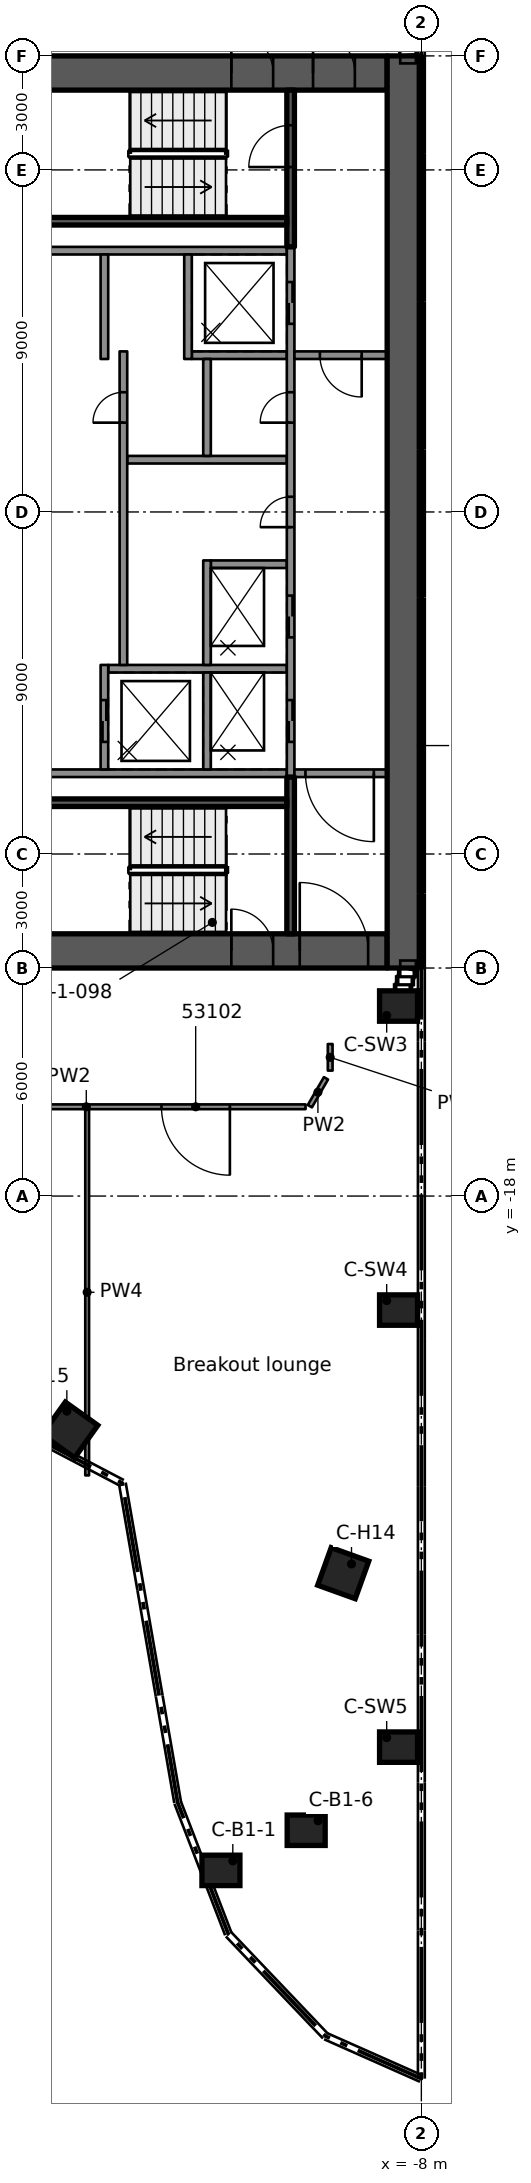
"""IFC4 building model, lengths in metres.
Left out: names, types, materials, properties, quantities, classifications, styles, units other than length and angle.
Written with IfcOpenShell. Run it as: python <this file> out.ifc"""

import sys

from ifc_helpers import new_model, si_unit, direction, frame, frame_2d, origin, origin_2d, place, context, subcontext, project, spatial, rectangle, extrude, element, fill, save


model = new_model("IFC4")
c1 = context("Model", 3, precision=1e-05, world=origin(), true_north=direction((0.0, 1.0)))
c2 = subcontext(c1, "Body", "Model", "MODEL_VIEW")
j1 = project(units=[si_unit("LENGTHUNIT", "METRE"), si_unit("PLANEANGLEUNIT", "RADIAN")], contexts=[c1])
p1 = place(None, origin())
s1 = spatial("IfcSite", under=j1, at=p1, CompositionType="ELEMENT")
p2 = place(p1, origin())
s2 = spatial("IfcBuilding", under=s1, at=p2, CompositionType="ELEMENT")
p3 = place(p2, frame((0.0, 0.0, 267.5)))
s3 = spatial("IfcBuildingStorey", under=s2, at=p3, CompositionType="ELEMENT", Elevation=267.5)
p4 = place(p3, frame((-18.1, 11.55, 0.0), z_axis=(0.0, 0.0, 1.0), x_axis=(1.0, 0.0, 0.0)))
e1 = element("IfcWall", 1, at=p4, inside=s3, PredefinedType="SHEAR", context=c2, shape_type="SweptSolid", body=[
    extrude(rectangle(XDim=9.2, YDim=0.9, at=frame_2d((4.6, 0.0))), origin(), (0.0, 0.0, 1.0), 3.5),
])
p5 = place(p4, frame((7.25, 0.0, 0.0)))
e2 = element("IfcOpeningElement", 2, at=p5, cuts=e1, PredefinedType="OPENING", context=c2, shape_type="SweptSolid", body=[
    extrude(rectangle(XDim=1.1, YDim=2.1, at=frame_2d((0.55, 1.05))), frame((0.0, 0.46, 0.0), z_axis=(0.0, -1.0, 0.0), x_axis=(1.0, 0.0, 0.0)), (0.0, 0.0, 1.0), 0.92),
])
p6 = place(p4, frame((5.1, 0.0, 0.0)))
e3 = element("IfcOpeningElement", 3, at=p6, cuts=e1, PredefinedType="OPENING", context=c2, shape_type="SweptSolid", body=[
    extrude(rectangle(XDim=1.1, YDim=2.1, at=frame_2d((0.55, 1.05))), frame((0.0, 0.46, 0.0), z_axis=(0.0, -1.0, 0.0), x_axis=(1.0, 0.0, 0.0)), (0.0, 0.0, 1.0), 0.92),
])
p7 = place(p3, frame((-18.1, -11.55, 0.0), z_axis=(0.0, 0.0, 1.0), x_axis=(1.0, 0.0, 0.0)))
e4 = element("IfcWall", 4, at=p7, inside=s3, PredefinedType="SHEAR", context=c2, shape_type="SweptSolid", body=[
    extrude(rectangle(XDim=9.2, YDim=0.9, at=frame_2d((4.6, 0.0))), origin(), (0.0, 0.0, 1.0), 3.5),
])
p8 = place(p7, frame((6.9, 0.0, 0.0)))
e5 = element("IfcOpeningElement", 5, at=p8, cuts=e4, PredefinedType="OPENING", context=c2, shape_type="SweptSolid", body=[
    extrude(rectangle(XDim=1.8, YDim=2.1, at=frame_2d((0.9, 1.05))), frame((0.0, 0.46, 0.0), z_axis=(0.0, -1.0, 0.0), x_axis=(1.0, 0.0, 0.0)), (0.0, 0.0, 1.0), 0.92),
])
p9 = place(p7, frame((5.1, 0.0, 0.0)))
e6 = element("IfcOpeningElement", 6, at=p9, cuts=e4, PredefinedType="OPENING", context=c2, shape_type="SweptSolid", body=[
    extrude(rectangle(XDim=1.1, YDim=2.1, at=frame_2d((0.55, 1.05))), frame((0.0, 0.46, 0.0), z_axis=(0.0, -1.0, 0.0), x_axis=(1.0, 0.0, 0.0)), (0.0, 0.0, 1.0), 0.92),
])
p10 = place(p3, frame((-8.45, -12.0, 0.0), z_axis=(0.0, 0.0, 1.0), x_axis=(0.0, 1.0, 0.0)))
e7 = element("IfcWall", 7, at=p10, inside=s3, PredefinedType="SHEAR", context=c2, shape_type="SweptSolid", body=[
    extrude(rectangle(XDim=24.0, YDim=0.9, at=frame_2d((12.0, 0.0))), origin(), (0.0, 0.0, 1.0), 3.5),
])
for number, where, z_axis, x_axis in (
    (8, (-13.274, -35.743, 0.0), (0.0, 0.0, 1.0), (1.0, 0.0, 0.0)),
    (9, (-11.031, -34.687, 0.0), (0.0, 0.0, 1.0), (1.0, 0.0, 0.0)),
):
    element("IfcColumn", number, at=place(p3, frame(where, z_axis=z_axis, x_axis=x_axis)), inside=s3, PredefinedType="COLUMN", context=c2, shape_type="SweptSolid", body=[
        extrude(rectangle(XDim=1.0, YDim=0.8, at=origin_2d()), origin(), (0.0, 0.0, 1.0), 3.5),
    ])
for number, where, z_axis, x_axis in (
    (10, (-10.056, -27.923, 0.0), (0.0, 0.0, 1.0), (-0.339, -0.941, 0.0)),
    (11, (-17.246, -24.154, 0.0), (0.0, 0.0, 1.0), (-0.581, -0.814, 0.0)),
):
    element("IfcColumn", number, at=place(p3, frame(where, z_axis=z_axis, x_axis=x_axis)), inside=s3, PredefinedType="COLUMN", context=c2, shape_type="SweptSolid", body=[
        extrude(rectangle(XDim=1.05, YDim=1.05, at=origin_2d()), origin(), (0.0, 0.0, 1.0), 3.5),
    ])
for number, where, z_axis, x_axis in (
    (12, (-8.6, -13.0, 0.0), (0.0, 0.0, 1.0), (1.0, 0.0, 0.0)),
    (13, (-8.6, -21.0, 0.0), (0.0, 0.0, 1.0), (1.0, 0.0, 0.0)),
    (14, (-8.6, -32.5, 0.0), (0.0, 0.0, 1.0), (1.0, 0.0, 0.0)),
):
    element("IfcColumn", number, at=place(p3, frame(where, z_axis=z_axis, x_axis=x_axis)), inside=s3, PredefinedType="COLUMN", context=c2, shape_type="SweptSolid", body=[
        extrude(rectangle(XDim=1.0, YDim=0.8, at=origin_2d()), origin(), (0.0, 0.0, 1.0), 3.5),
    ])
for number, where, z_axis, x_axis in (
    (15, (-11.54, 6.875, 0.0), (0.0, 0.0, 1.0), (-1.0, 0.0, 0.0)),
    (16, (-11.54, -6.875, 0.0), (0.0, 0.0, 1.0), (-1.0, 0.0, 0.0)),
):
    element("IfcWall", number, at=place(p3, frame(where, z_axis=z_axis, x_axis=x_axis)), inside=s3, PredefinedType="SOLIDWALL", context=c2, shape_type="SweptSolid", body=[
        extrude(rectangle(XDim=6.56, YDim=0.2, at=frame_2d((3.28, 0.0))), origin(), (0.0, 0.0, 1.0), 3.05),
    ])
p11 = place(p3, frame((-11.54, -4.125, 0.0), z_axis=(0.0, 0.0, 1.0), x_axis=(-1.0, 0.0, 0.0)))
e17 = element("IfcWall", 17, at=p11, inside=s3, PredefinedType="SOLIDWALL", context=c2, shape_type="SweptSolid", body=[
    extrude(rectangle(XDim=4.7, YDim=0.2, at=frame_2d((2.35, 0.0))), origin(), (0.0, 0.0, 1.0), 3.05),
])
p12 = place(p3, frame((-11.54, -1.375, 0.0), z_axis=(0.0, 0.0, 1.0), x_axis=(-1.0, 0.0, 0.0)))
e18 = element("IfcWall", 18, at=p12, inside=s3, PredefinedType="SOLIDWALL", context=c2, shape_type="SweptSolid", body=[
    extrude(rectangle(XDim=2.0, YDim=0.2, at=frame_2d((1.0, 0.0))), origin(), (0.0, 0.0, 1.0), 3.05),
])
p13 = place(p3, frame((-11.54, 1.375, 0.0), z_axis=(0.0, 0.0, 1.0), x_axis=(-1.0, 0.0, 0.0)))
e19 = element("IfcWall", 19, at=p13, inside=s3, PredefinedType="SOLIDWALL", context=c2, shape_type="SweptSolid", body=[
    extrude(rectangle(XDim=4.2, YDim=0.2, at=frame_2d((2.1, 0.0))), origin(), (0.0, 0.0, 1.0), 3.05),
])
p14 = place(p3, frame((-11.54, 4.125, 0.0), z_axis=(0.0, 0.0, 1.0), x_axis=(-1.0, 0.0, 0.0)))
e20 = element("IfcWall", 20, at=p14, inside=s3, PredefinedType="SOLIDWALL", context=c2, shape_type="SweptSolid", body=[
    extrude(rectangle(XDim=2.5, YDim=0.2, at=frame_2d((1.25, 0.0))), origin(), (0.0, 0.0, 1.0), 3.05),
])
p15 = place(p3, frame((-11.44, -6.975, 0.0), z_axis=(0.0, 0.0, 1.0), x_axis=(0.0, 1.0, 0.0)))
e21 = element("IfcWall", 21, at=p15, inside=s3, PredefinedType="SOLIDWALL", context=c2, shape_type="SweptSolid", body=[
    extrude(rectangle(XDim=13.95, YDim=0.2, at=frame_2d((6.975, 0.0))), origin(), (0.0, 0.0, 1.0), 3.05),
])
p16 = place(p15, frame((0.925, 0.0, 0.0)))
e22 = element("IfcOpeningElement", 22, at=p16, cuts=e21, PredefinedType="OPENING", context=c2, shape_type="SweptSolid", body=[
    extrude(rectangle(XDim=1.1, YDim=2.1, at=frame_2d((0.55, 1.05))), frame((0.0, 0.11, 0.0), z_axis=(0.0, -1.0, 0.0), x_axis=(1.0, 0.0, 0.0)), (0.0, 0.0, 1.0), 0.22),
])
p17 = place(p15, frame((3.675, 0.0, 0.0)))
e23 = element("IfcOpeningElement", 23, at=p17, cuts=e21, PredefinedType="OPENING", context=c2, shape_type="SweptSolid", body=[
    extrude(rectangle(XDim=1.1, YDim=2.1, at=frame_2d((0.55, 1.05))), frame((0.0, 0.11, 0.0), z_axis=(0.0, -1.0, 0.0), x_axis=(1.0, 0.0, 0.0)), (0.0, 0.0, 1.0), 0.22),
])
p18 = place(p15, frame((11.925, 0.0, 0.0)))
e24 = element("IfcOpeningElement", 24, at=p18, cuts=e21, PredefinedType="OPENING", context=c2, shape_type="SweptSolid", body=[
    extrude(rectangle(XDim=1.1, YDim=2.1, at=frame_2d((0.55, 1.05))), frame((0.0, 0.11, 0.0), z_axis=(0.0, -1.0, 0.0), x_axis=(1.0, 0.0, 0.0)), (0.0, 0.0, 1.0), 0.22),
])
p19 = place(p15, frame((6.575, 0.0, 0.0)))
e25 = element("IfcOpeningElement", 25, at=p19, cuts=e21, PredefinedType="OPENING", context=c2, shape_type="SweptSolid", body=[
    extrude(rectangle(XDim=0.8, YDim=2.1, at=frame_2d((0.4, 1.05))), frame((0.0, 0.11, 0.0), z_axis=(0.0, -1.0, 0.0), x_axis=(1.0, 0.0, 0.0)), (0.0, 0.0, 1.0), 0.22),
])
p20 = place(p15, frame((9.325, 0.0, 0.0)))
e26 = element("IfcOpeningElement", 26, at=p20, cuts=e21, PredefinedType="OPENING", context=c2, shape_type="SweptSolid", body=[
    extrude(rectangle(XDim=0.8, YDim=2.1, at=frame_2d((0.4, 1.05))), frame((0.0, 0.11, 0.0), z_axis=(0.0, -1.0, 0.0), x_axis=(1.0, 0.0, 0.0)), (0.0, 0.0, 1.0), 0.22),
])
p21 = place(p3, frame((-13.64, -6.775, 0.0), z_axis=(0.0, 0.0, 1.0), x_axis=(0.0, 1.0, 0.0)))
e27 = element("IfcWall", 27, at=p21, inside=s3, PredefinedType="SOLIDWALL", context=c2, shape_type="SweptSolid", body=[
    extrude(rectangle(XDim=2.55, YDim=0.2, at=frame_2d((1.275, 0.0))), origin(), (0.0, 0.0, 1.0), 3.05),
])
p22 = place(p3, frame((-13.64, -4.025, 0.0), z_axis=(0.0, 0.0, 1.0), x_axis=(0.0, 1.0, 0.0)))
e28 = element("IfcWall", 28, at=p22, inside=s3, PredefinedType="SOLIDWALL", context=c2, shape_type="SweptSolid", body=[
    extrude(rectangle(XDim=2.75, YDim=0.2, at=frame_2d((1.375, 0.0))), origin(), (0.0, 0.0, 1.0), 3.05),
])
p23 = place(p3, frame((-13.64, 1.475, 0.0), z_axis=(0.0, 0.0, 1.0), x_axis=(0.0, 1.0, 0.0)))
e29 = element("IfcWall", 29, at=p23, inside=s3, PredefinedType="SOLIDWALL", context=c2, shape_type="SweptSolid", body=[
    extrude(rectangle(XDim=2.55, YDim=0.2, at=frame_2d((1.275, 0.0))), origin(), (0.0, 0.0, 1.0), 3.05),
])
p24 = place(p3, frame((-14.14, 4.025, 0.0), z_axis=(0.0, 0.0, 1.0), x_axis=(0.0, 1.0, 0.0)))
e30 = element("IfcWall", 30, at=p24, inside=s3, PredefinedType="SOLIDWALL", context=c2, shape_type="SweptSolid", body=[
    extrude(rectangle(XDim=2.75, YDim=0.2, at=frame_2d((1.375, 0.0))), origin(), (0.0, 0.0, 1.0), 3.05),
])
p25 = place(p3, frame((-16.34, -6.775, 0.0), z_axis=(0.0, 0.0, 1.0), x_axis=(0.0, 1.0, 0.0)))
e31 = element("IfcWall", 31, at=p25, inside=s3, PredefinedType="SOLIDWALL", context=c2, shape_type="SweptSolid", body=[
    extrude(rectangle(XDim=2.75, YDim=0.2, at=frame_2d((1.375, 0.0))), origin(), (0.0, 0.0, 1.0), 3.05),
])
p26 = place(p25, frame((0.725, 0.0, 0.0)))
e32 = element("IfcOpeningElement", 32, at=p26, cuts=e31, PredefinedType="OPENING", context=c2, shape_type="SweptSolid", body=[
    extrude(rectangle(XDim=1.1, YDim=2.1, at=frame_2d((0.55, 1.05))), frame((0.0, 0.11, 0.0), z_axis=(0.0, -1.0, 0.0), x_axis=(1.0, 0.0, 0.0)), (0.0, 0.0, 1.0), 0.22),
])
p27 = place(p3, frame((-15.84, -4.025, 0.0), z_axis=(0.0, 0.0, 1.0), x_axis=(0.0, 1.0, 0.0)))
e33 = element("IfcWall", 33, at=p27, inside=s3, PredefinedType="SOLIDWALL", context=c2, shape_type="SweptSolid", body=[
    extrude(rectangle(XDim=8.25, YDim=0.2, at=frame_2d((4.125, 0.0))), origin(), (0.0, 0.0, 1.0), 3.05),
])
p28 = place(p27, frame((6.375, 0.0, 0.0)))
e34 = element("IfcOpeningElement", 34, at=p28, cuts=e33, PredefinedType="OPENING", context=c2, shape_type="SweptSolid", body=[
    extrude(rectangle(XDim=0.8, YDim=2.1, at=frame_2d((0.4, 1.05))), frame((0.0, 0.11, 0.0), z_axis=(0.0, -1.0, 0.0), x_axis=(1.0, 0.0, 0.0)), (0.0, 0.0, 1.0), 0.22),
])
p29 = place(p3, frame((-16.34, 4.025, 0.0), z_axis=(0.0, 0.0, 1.0), x_axis=(0.0, 1.0, 0.0)))
e35 = element("IfcWall", 35, at=p29, inside=s3, PredefinedType="SOLIDWALL", context=c2, shape_type="SweptSolid", body=[
    extrude(rectangle(XDim=2.75, YDim=0.2, at=frame_2d((1.375, 0.0))), origin(), (0.0, 0.0, 1.0), 3.05),
])
p30 = place(p3, frame((-11.44, 6.975, 0.0), z_axis=(0.0, 0.0, 1.0), x_axis=(0.0, 1.0, 0.0)))
e36 = element("IfcWall", 36, at=p30, inside=s3, PredefinedType="SOLIDWALL", context=c2, shape_type="SweptSolid", body=[
    extrude(rectangle(XDim=4.125, YDim=0.2, at=frame_2d((2.062, 0.0))), origin(), (0.0, 0.0, 1.0), 3.05),
])
p31 = place(p30, frame((2.1, 0.0, 0.0)))
e37 = element("IfcOpeningElement", 37, at=p31, cuts=e36, PredefinedType="OPENING", context=c2, shape_type="SweptSolid", body=[
    extrude(rectangle(XDim=1.1, YDim=2.1, at=frame_2d((0.55, 1.05))), frame((0.0, 0.11, 0.0), z_axis=(0.0, -1.0, 0.0), x_axis=(1.0, 0.0, 0.0)), (0.0, 0.0, 1.0), 0.22),
])
p32 = place(p3, frame((-11.54, 7.65, 0.0), z_axis=(0.0, 0.0, 1.0), x_axis=(-1.0, 0.0, 0.0)))
e38 = element("IfcWall", 38, at=p32, inside=s3, PredefinedType="SOLIDWALL", context=c2, shape_type="SweptSolid", body=[
    extrude(rectangle(XDim=6.56, YDim=0.2, at=frame_2d((3.28, 0.0))), origin(), (0.0, 0.0, 1.0), 3.05),
])
p33 = place(p3, frame((-11.44, -11.1, 0.0), z_axis=(0.0, 0.0, 1.0), x_axis=(0.0, 1.0, 0.0)))
e39 = element("IfcWall", 39, at=p33, inside=s3, PredefinedType="SOLIDWALL", context=c2, shape_type="SweptSolid", body=[
    extrude(rectangle(XDim=4.125, YDim=0.2, at=frame_2d((2.062, 0.0))), origin(), (0.0, 0.0, 1.0), 3.05),
])
p34 = place(p3, frame((-11.54, -7.65, 0.0), z_axis=(0.0, 0.0, 1.0), x_axis=(-1.0, 0.0, 0.0)))
e40 = element("IfcWall", 40, at=p34, inside=s3, PredefinedType="SOLIDWALL", context=c2, shape_type="SweptSolid", body=[
    extrude(rectangle(XDim=6.56, YDim=0.2, at=frame_2d((3.28, 0.0))), origin(), (0.0, 0.0, 1.0), 3.05),
])
p35 = place(p3, frame((-8.9, 4.125, 0.0), z_axis=(0.0, 0.0, 1.0), x_axis=(-1.0, 0.0, 0.0)))
e41 = element("IfcWall", 41, at=p35, inside=s3, PredefinedType="PARTITIONING", context=c2, shape_type="SweptSolid", body=[
    extrude(rectangle(XDim=2.44, YDim=0.2, at=frame_2d((1.22, 0.0))), origin(), (0.0, 0.0, 1.0), 3.05),
])
p36 = place(p35, frame((0.67, 0.0, 0.0)))
e42 = element("IfcOpeningElement", 42, at=p36, cuts=e41, PredefinedType="OPENING", context=c2, shape_type="SweptSolid", body=[
    extrude(rectangle(XDim=1.1, YDim=2.1, at=frame_2d((0.55, 1.05))), frame((0.0, 0.11, 0.0), z_axis=(0.0, -1.0, 0.0), x_axis=(1.0, 0.0, 0.0)), (0.0, 0.0, 1.0), 0.22),
])
p37 = place(p3, frame((-8.9, -6.875, 0.0), z_axis=(0.0, 0.0, 1.0), x_axis=(-1.0, 0.0, 0.0)))
e43 = element("IfcWall", 43, at=p37, inside=s3, PredefinedType="PARTITIONING", context=c2, shape_type="SweptSolid", body=[
    extrude(rectangle(XDim=2.44, YDim=0.2, at=frame_2d((1.22, 0.0))), origin(), (0.0, 0.0, 1.0), 3.05),
])
p38 = place(p37, frame((0.35, 0.0, 0.0)))
e44 = element("IfcOpeningElement", 44, at=p38, cuts=e43, PredefinedType="OPENING", context=c2, shape_type="SweptSolid", body=[
    extrude(rectangle(XDim=1.8, YDim=2.1, at=frame_2d((0.9, 1.05))), frame((0.0, 0.11, 0.0), z_axis=(0.0, -1.0, 0.0), x_axis=(1.0, 0.0, 0.0)), (0.0, 0.0, 1.0), 0.22),
])
p39 = place(p3, frame((-11.047, -15.651, 0.0), z_axis=(0.0, 0.0, 1.0), x_axis=(-1.0, 0.0, 0.0)))
e45 = element("IfcWall", 45, at=p39, inside=s3, PredefinedType="PARTITIONING", context=c2, shape_type="SweptSolid", body=[
    extrude(rectangle(XDim=11.54, YDim=0.125, at=frame_2d((5.77, 0.0))), origin(), (0.0, 0.0, 1.0), 3.03),
])
p40 = place(p39, frame((1.992, 0.0, 0.0)))
e46 = element("IfcOpeningElement", 46, at=p40, cuts=e45, PredefinedType="OPENING", context=c2, shape_type="SweptSolid", body=[
    extrude(rectangle(XDim=1.8, YDim=2.1, at=frame_2d((0.9, 1.05))), frame((0.0, 0.073, 0.0), z_axis=(0.0, -1.0, 0.0), x_axis=(1.0, 0.0, 0.0)), (0.0, 0.0, 1.0), 0.145),
])
p41 = place(p3, frame((-10.934, -15.635, 0.0), z_axis=(0.0, 0.0, 1.0), x_axis=(0.500820310379, 0.865551279077, 0.0)))
e47 = element("IfcWall", 47, at=p41, inside=s3, PredefinedType="PARTITIONING", context=c2, shape_type="SweptSolid", body=[
    extrude(rectangle(XDim=0.847, YDim=0.125, at=frame_2d((0.423, 0.0))), origin(), (0.0, 0.0, 1.0), 3.03),
])
p42 = place(p3, frame((-10.399, -14.699, 0.0), z_axis=(0.0, 0.0, 1.0), x_axis=(0.0, 1.0, 0.0)))
e48 = element("IfcWall", 48, at=p42, inside=s3, PredefinedType="PARTITIONING", context=c2, shape_type="SweptSolid", body=[
    extrude(rectangle(XDim=0.699, YDim=0.125, at=frame_2d((0.35, 0.0))), origin(), (0.0, 0.0, 1.0), 3.03),
])
p43 = place(p3, frame((-16.794, -25.35, 0.0), z_axis=(0.0, 0.0, 1.0), x_axis=(0.0, 1.0, 0.0)))
e49 = element("IfcWall", 49, at=p43, inside=s3, PredefinedType="PARTITIONING", context=c2, shape_type="SweptSolid", body=[
    extrude(rectangle(XDim=9.637, YDim=0.1, at=frame_2d((4.819, 0.0))), origin(), (0.0, 0.0, 1.0), 2.419),
])
p44 = place(p16, origin())
e50 = element("IfcDoor", 50, at=p44, inside=s3, OperationType="DOUBLE_DOOR_SLIDING", PredefinedType="DOOR", context=c2, shape_type="SweptSolid", body=[
    extrude(rectangle(XDim=1.1, YDim=2.1, at=frame_2d((0.55, 1.05))), frame((0.0, 0.025, 0.0), z_axis=(0.0, -1.0, 0.0), x_axis=(1.0, 0.0, 0.0)), (0.0, 0.0, 1.0), 0.05),
])
fill(e22, e50)
p45 = place(p26, origin())
e51 = element("IfcDoor", 51, at=p45, inside=s3, OperationType="DOUBLE_DOOR_SLIDING", PredefinedType="DOOR", context=c2, shape_type="SweptSolid", body=[
    extrude(rectangle(XDim=1.1, YDim=2.1, at=frame_2d((0.55, 1.05))), frame((0.0, 0.025, 0.0), z_axis=(0.0, -1.0, 0.0), x_axis=(1.0, 0.0, 0.0)), (0.0, 0.0, 1.0), 0.05),
])
fill(e32, e51)
p46 = place(p17, origin())
e52 = element("IfcDoor", 52, at=p46, inside=s3, OperationType="DOUBLE_DOOR_SLIDING", PredefinedType="DOOR", context=c2, shape_type="SweptSolid", body=[
    extrude(rectangle(XDim=1.1, YDim=2.1, at=frame_2d((0.55, 1.05))), frame((0.0, 0.025, 0.0), z_axis=(0.0, -1.0, 0.0), x_axis=(1.0, 0.0, 0.0)), (0.0, 0.0, 1.0), 0.05),
])
fill(e23, e52)
p47 = place(p18, origin())
e53 = element("IfcDoor", 53, at=p47, inside=s3, OperationType="DOUBLE_DOOR_SLIDING", PredefinedType="DOOR", context=c2, shape_type="SweptSolid", body=[
    extrude(rectangle(XDim=1.1, YDim=2.1, at=frame_2d((0.55, 1.05))), frame((0.0, 0.025, 0.0), z_axis=(0.0, -1.0, 0.0), x_axis=(1.0, 0.0, 0.0)), (0.0, 0.0, 1.0), 0.05),
])
fill(e24, e53)
p48 = place(p19, origin())
e54 = element("IfcDoor", 54, at=p48, inside=s3, OperationType="SINGLE_SWING_RIGHT", PredefinedType="DOOR", context=c2, shape_type="SweptSolid", body=[
    extrude(rectangle(XDim=0.8, YDim=2.1, at=frame_2d((0.4, 1.05))), frame((0.0, 0.025, 0.0), z_axis=(0.0, -1.0, 0.0), x_axis=(1.0, 0.0, 0.0)), (0.0, 0.0, 1.0), 0.05),
])
fill(e25, e54)
p49 = place(p20, origin())
e55 = element("IfcDoor", 55, at=p49, inside=s3, OperationType="SINGLE_SWING_LEFT", PredefinedType="DOOR", context=c2, shape_type="SweptSolid", body=[
    extrude(rectangle(XDim=0.8, YDim=2.1, at=frame_2d((0.4, 1.05))), frame((0.0, 0.025, 0.0), z_axis=(0.0, -1.0, 0.0), x_axis=(1.0, 0.0, 0.0)), (0.0, 0.0, 1.0), 0.05),
])
fill(e26, e55)
p50 = place(p28, origin())
e56 = element("IfcDoor", 56, at=p50, inside=s3, OperationType="SINGLE_SWING_LEFT", PredefinedType="DOOR", context=c2, shape_type="SweptSolid", body=[
    extrude(rectangle(XDim=0.8, YDim=2.1, at=frame_2d((0.4, 1.05))), frame((0.0, 0.025, 0.0), z_axis=(0.0, -1.0, 0.0), x_axis=(1.0, 0.0, 0.0)), (0.0, 0.0, 1.0), 0.05),
])
fill(e34, e56)
p51 = place(p5, origin())
e57 = element("IfcDoor", 57, at=p51, inside=s3, OperationType="SINGLE_SWING_RIGHT", PredefinedType="DOOR", context=c2, shape_type="SweptSolid", body=[
    extrude(rectangle(XDim=1.1, YDim=2.1, at=frame_2d((0.55, 1.05))), frame((0.0, 0.025, 0.0), z_axis=(0.0, -1.0, 0.0), x_axis=(1.0, 0.0, 0.0)), (0.0, 0.0, 1.0), 0.05),
])
fill(e2, e57)
p52 = place(p36, origin())
e58 = element("IfcDoor", 58, at=p52, inside=s3, OperationType="SINGLE_SWING_RIGHT", PredefinedType="DOOR", context=c2, shape_type="SweptSolid", body=[
    extrude(rectangle(XDim=1.1, YDim=2.1, at=frame_2d((0.55, 1.05))), frame((0.0, 0.025, 0.0), z_axis=(0.0, -1.0, 0.0), x_axis=(1.0, 0.0, 0.0)), (0.0, 0.0, 1.0), 0.05),
])
fill(e42, e58)
p53 = place(p38, origin())
e59 = element("IfcDoor", 59, at=p53, inside=s3, OperationType="DOUBLE_DOOR_DOUBLE_SWING", PredefinedType="DOOR", context=c2, shape_type="SweptSolid", body=[
    extrude(rectangle(XDim=1.8, YDim=2.1, at=frame_2d((0.9, 1.05))), frame((0.0, 0.025, 0.0), z_axis=(0.0, -1.0, 0.0), x_axis=(1.0, 0.0, 0.0)), (0.0, 0.0, 1.0), 0.05),
])
fill(e44, e59)
p54 = place(p8, origin())
e60 = element("IfcDoor", 60, at=p54, inside=s3, OperationType="SINGLE_SWING_RIGHT", PredefinedType="DOOR", context=c2, shape_type="SweptSolid", body=[
    extrude(rectangle(XDim=1.8, YDim=2.1, at=frame_2d((0.9, 1.05))), frame((0.0, 0.025, 0.0), z_axis=(0.0, -1.0, 0.0), x_axis=(1.0, 0.0, 0.0)), (0.0, 0.0, 1.0), 0.05),
])
fill(e5, e60)
p55 = place(p6, origin())
e61 = element("IfcDoor", 61, at=p55, inside=s3, OperationType="SINGLE_SWING_RIGHT", PredefinedType="DOOR", context=c2, shape_type="SweptSolid", body=[
    extrude(rectangle(XDim=1.1, YDim=2.1, at=frame_2d((0.55, 1.05))), frame((0.0, 0.025, 0.0), z_axis=(0.0, -1.0, 0.0), x_axis=(1.0, 0.0, 0.0)), (0.0, 0.0, 1.0), 0.05),
])
fill(e3, e61)
p56 = place(p9, origin())
e62 = element("IfcDoor", 62, at=p56, inside=s3, OperationType="SINGLE_SWING_RIGHT", PredefinedType="DOOR", context=c2, shape_type="SweptSolid", body=[
    extrude(rectangle(XDim=1.1, YDim=2.1, at=frame_2d((0.55, 1.05))), frame((0.0, 0.025, 0.0), z_axis=(0.0, -1.0, 0.0), x_axis=(1.0, 0.0, 0.0)), (0.0, 0.0, 1.0), 0.05),
])
fill(e6, e62)
p57 = place(p31, origin())
e63 = element("IfcDoor", 63, at=p57, inside=s3, OperationType="SINGLE_SWING_RIGHT", PredefinedType="DOOR", context=c2, shape_type="SweptSolid", body=[
    extrude(rectangle(XDim=1.1, YDim=2.1, at=frame_2d((0.55, 1.05))), frame((0.0, 0.025, 0.0), z_axis=(0.0, -1.0, 0.0), x_axis=(1.0, 0.0, 0.0)), (0.0, 0.0, 1.0), 0.05),
])
fill(e37, e63)
p58 = place(p40, origin())
e64 = element("IfcDoor", 64, at=p58, inside=s3, OperationType="DOUBLE_DOOR_SINGLE_SWING", PredefinedType="DOOR", context=c2, shape_type="SweptSolid", body=[
    extrude(rectangle(XDim=1.8, YDim=2.1, at=frame_2d((0.9, 1.05))), frame((0.0, 0.025, 0.0), z_axis=(0.0, -1.0, 0.0), x_axis=(1.0, 0.0, 0.0)), (0.0, 0.0, 1.0), 0.05),
])
fill(e46, e64)
save(model, sys.argv[1])
